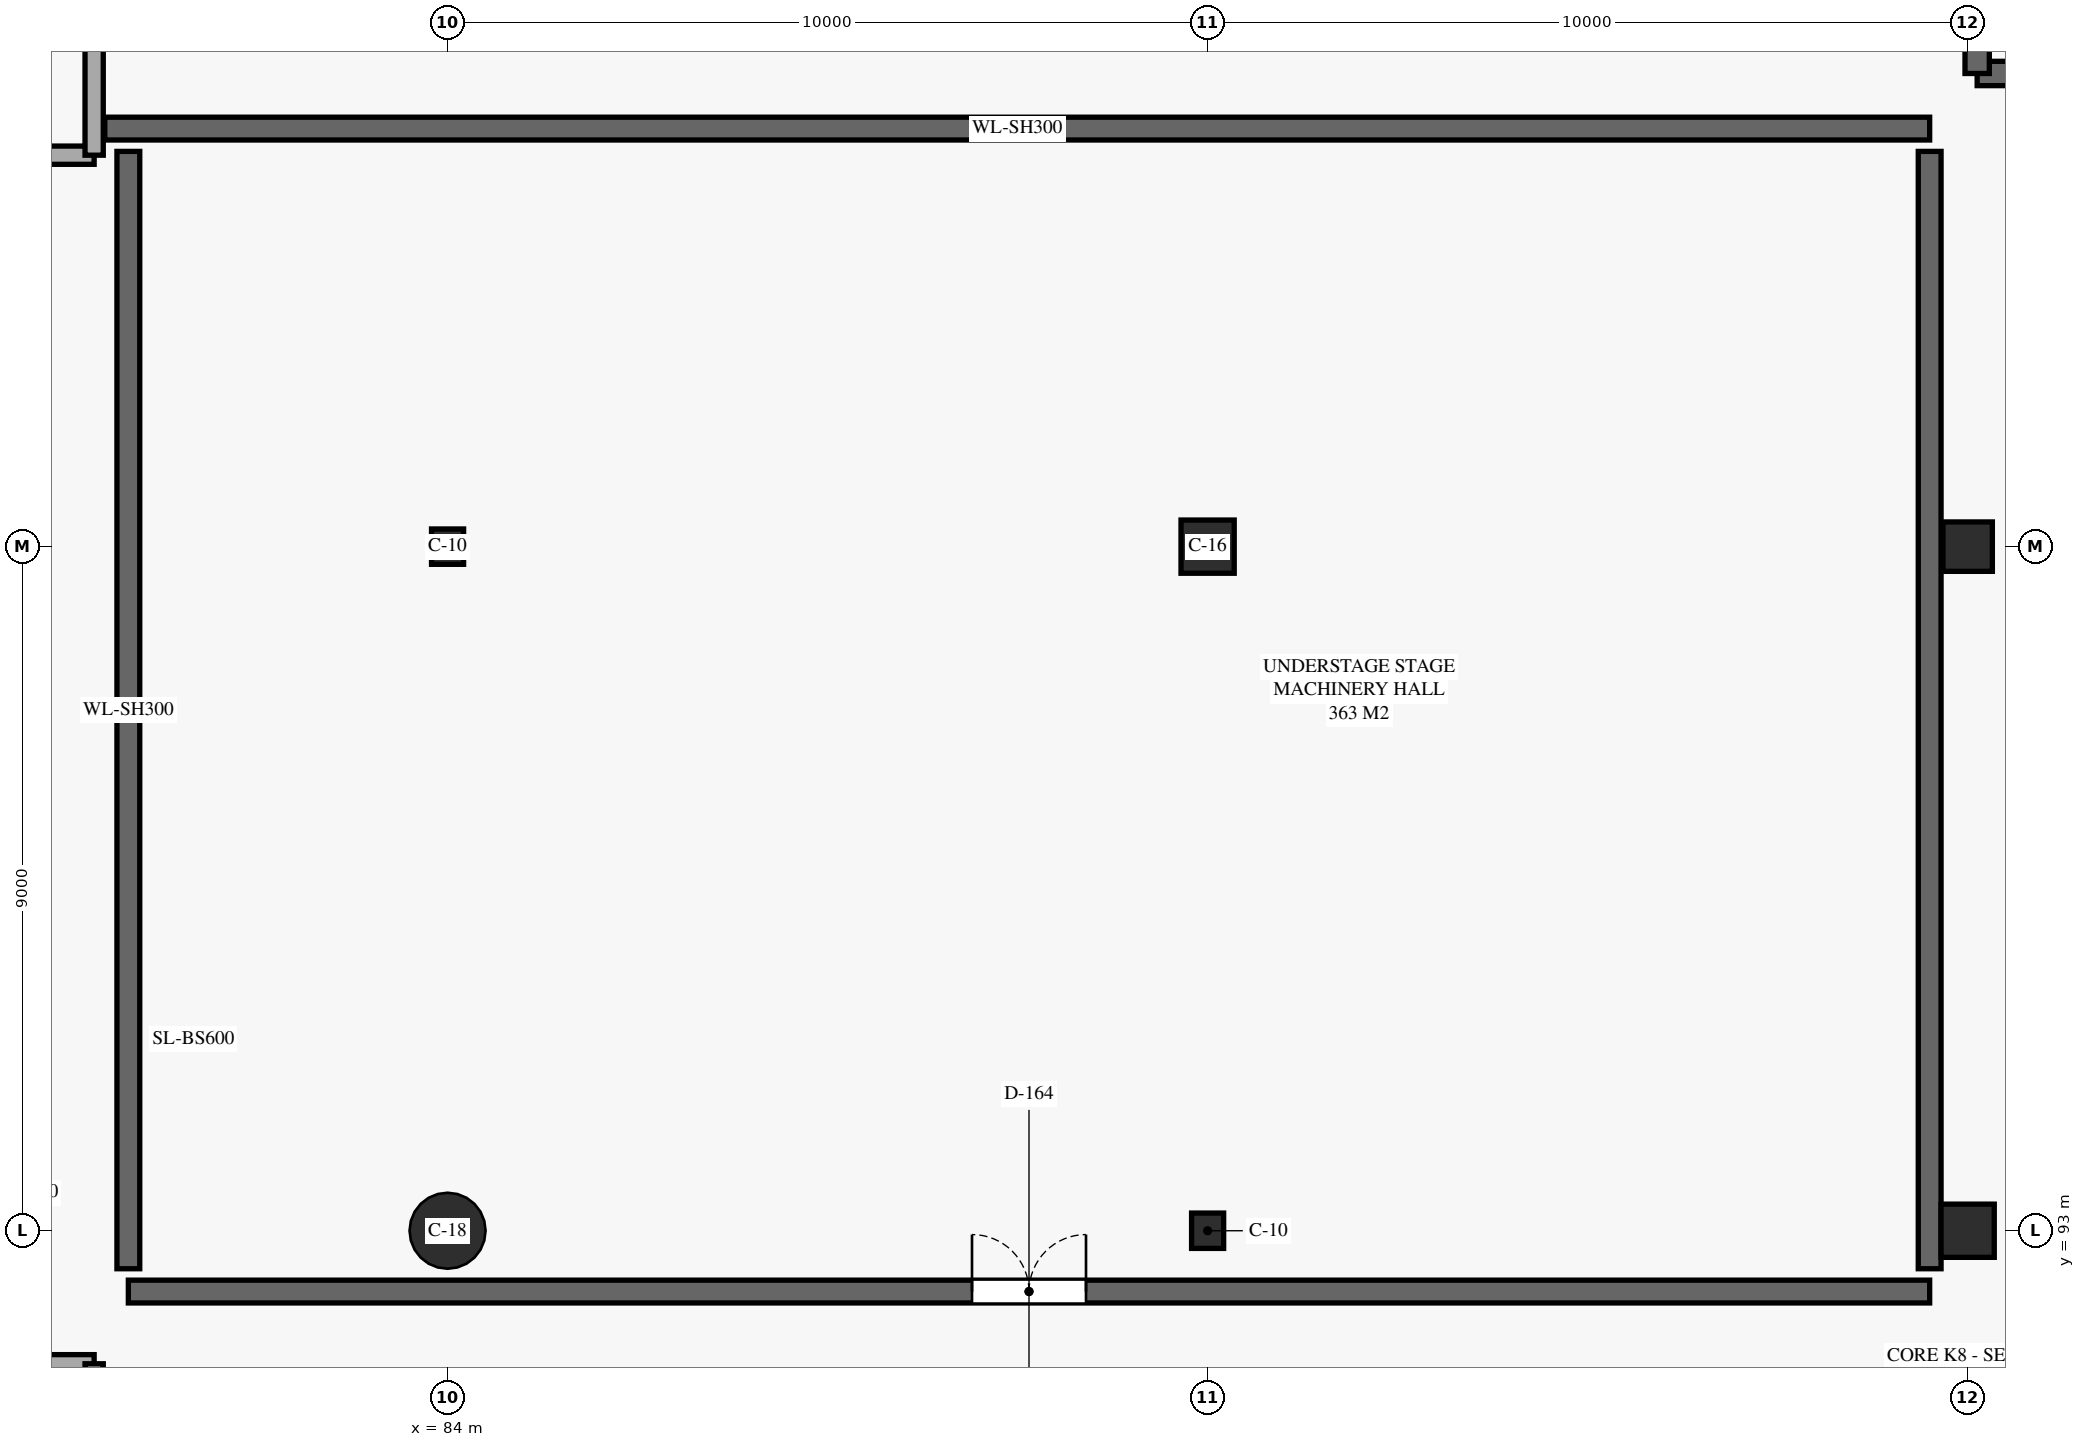
"""IFC4 building model, lengths in metres.
Left out: names, types, materials, properties, quantities, classifications, styles, units other than length and angle.
Written with IfcOpenShell. Run it as: python <this file> out.ifc"""

import sys

from ifc_helpers import new_model, si_unit, direction, frame, frame_2d, origin, origin_2d, place, context, subcontext, project, spatial, rectangle, circle, i_section, extrude, element, fill, save


model = new_model("IFC4")
c1 = context("Model", 3, precision=1e-05, world=origin(), true_north=direction((0.0, 1.0)))
c2 = subcontext(c1, "Body", "Model", "MODEL_VIEW")
j1 = project(units=[si_unit("LENGTHUNIT", "METRE"), si_unit("PLANEANGLEUNIT", "RADIAN")], contexts=[c1])
p1 = place(None, origin())
s1 = spatial("IfcSite", under=j1, at=p1, CompositionType="ELEMENT")
p2 = place(p1, origin())
s2 = spatial("IfcBuilding", under=s1, at=p2, CompositionType="ELEMENT")
p3 = place(p2, frame((0.0, 0.0, -5.4)))
s3 = spatial("IfcBuildingStorey", under=s2, at=p3, CompositionType="ELEMENT", Elevation=-5.4)
p4 = place(p3, frame((84.0, 93.0, -0.6), z_axis=(0.0, 0.0, 1.0), x_axis=(1.0, 0.0, 0.0)))
e1 = element("IfcColumn", 1, at=p4, inside=s3, PredefinedType="COLUMN", context=c2, shape_type="SweptSolid", body=[
    extrude(circle(Radius=0.5, at=origin_2d()), origin(), (0.0, 0.0, 1.0), 6.0),
])
for number, where, z_axis, x_axis in (
    (2, (84.0, 102.0, -0.6), (0.0, 0.0, 1.0), (1.0, 0.0, 0.0)),
    (3, (94.0, 93.0, -0.6), (0.0, 0.0, 1.0), (1.0, 0.0, 0.0)),
):
    element("IfcColumn", number, at=place(p3, frame(where, z_axis=z_axis, x_axis=x_axis)), inside=s3, PredefinedType="COLUMN", context=c2, shape_type="SweptSolid", body=[
        extrude(i_section(OverallWidth=0.422, OverallDepth=0.465, WebThickness=0.045, FlangeThickness=0.073, FilletRadius=0.02, at=origin_2d()), origin(), (0.0, 0.0, 1.0), 6.0),
    ])
for number, where, z_axis, x_axis in (
    (4, (94.0, 102.0, -0.6), (0.0, 0.0, 1.0), (1.0, 0.0, 0.0)),
    (5, (104.0, 93.0, -0.6), (0.0, 0.0, 1.0), (1.0, 0.0, 0.0)),
):
    element("IfcColumn", number, at=place(p3, frame(where, z_axis=z_axis, x_axis=x_axis)), inside=s3, PredefinedType="COLUMN", context=c2, shape_type="SweptSolid", body=[
        extrude(rectangle(XDim=0.7, YDim=0.7, at=origin_2d()), origin(), (0.0, 0.0, 1.0), 6.0),
    ])
p5 = place(p3, frame((104.0, 102.0, -0.6), z_axis=(0.0, 0.0, 1.0), x_axis=(1.0, 0.0, 0.0)))
e6 = element("IfcColumn", 6, at=p5, inside=s3, PredefinedType="COLUMN", context=c2, shape_type="SweptSolid", body=[
    extrude(rectangle(XDim=0.65, YDim=0.65, at=origin_2d()), origin(), (0.0, 0.0, 1.0), 6.0),
])
p6 = place(p3, frame((104.125, 108.225, 0.0), z_axis=(0.0, 0.0, 1.0), x_axis=(1.0, 0.0, 0.0)))
e7 = element("IfcWall", 7, at=p6, inside=s3, PredefinedType="SHEAR", context=c2, shape_type="SweptSolid", body=[
    extrude(rectangle(XDim=9.25, YDim=0.32, at=frame_2d((4.625, 0.0))), origin(), (0.0, 0.0, 1.0), 5.0),
])
p7 = place(p6, frame((0.8, 0.0, 0.0)))
e8 = element("IfcOpeningElement", 8, at=p7, cuts=e7, PredefinedType="OPENING", context=c2, shape_type="SweptSolid", body=[
    extrude(rectangle(XDim=1.15, YDim=2.2, at=frame_2d((0.575, 1.1))), frame((0.0, 0.17, 0.0), z_axis=(0.0, -1.0, 0.0), x_axis=(1.0, 0.0, 0.0)), (0.0, 0.0, 1.0), 0.34),
])
p8 = place(p3, frame((104.125, 113.275, 0.0), z_axis=(0.0, 0.0, 1.0), x_axis=(0.0, -1.0, 0.0)))
e9 = element("IfcWall", 9, at=p8, inside=s3, PredefinedType="SHEAR", context=c2, shape_type="SweptSolid", body=[
    extrude(rectangle(XDim=5.05, YDim=0.32, at=frame_2d((2.525, 0.0))), origin(), (0.0, 0.0, 1.0), 5.0),
])
p9 = place(p3, frame((74.55, 91.25, 0.0), z_axis=(0.0, 0.0, 1.0), x_axis=(1.0, 0.0, 0.0)))
e10 = element("IfcWall", 10, at=p9, inside=s3, PredefinedType="SOLIDWALL", context=c2, shape_type="SweptSolid", body=[
    extrude(rectangle(XDim=4.8, YDim=0.24, at=frame_2d((2.4, 0.0))), origin(), (0.0, 0.0, 1.0), 5.0),
])
p10 = place(p9, frame((1.2, 0.0, 0.0)))
e11 = element("IfcOpeningElement", 11, at=p10, cuts=e10, PredefinedType="OPENING", context=c2, shape_type="SweptSolid", body=[
    extrude(rectangle(XDim=1.6, YDim=2.2, at=frame_2d((0.8, 1.1))), frame((0.0, 0.13, 0.0), z_axis=(0.0, -1.0, 0.0), x_axis=(1.0, 0.0, 0.0)), (0.0, 0.0, 1.0), 0.26),
])
p11 = place(p3, frame((79.35, 87.45, 0.0), z_axis=(0.0, 0.0, 1.0), x_axis=(0.0, 1.0, 0.0)))
e12 = element("IfcWall", 12, at=p11, inside=s3, PredefinedType="SOLIDWALL", context=c2, shape_type="SweptSolid", body=[
    extrude(rectangle(XDim=3.8, YDim=0.24, at=frame_2d((1.9, 0.0))), origin(), (0.0, 0.0, 1.0), 5.0),
])
p12 = place(p3, frame((74.55, 107.15, 0.0), z_axis=(0.0, 0.0, 1.0), x_axis=(1.0, 0.0, 0.0)))
e13 = element("IfcWall", 13, at=p12, inside=s3, PredefinedType="SOLIDWALL", context=c2, shape_type="SweptSolid", body=[
    extrude(rectangle(XDim=4.8, YDim=0.24, at=frame_2d((2.4, 0.0))), origin(), (0.0, 0.0, 1.0), 5.0),
])
p13 = place(p12, frame((1.2, 0.0, 0.0)))
e14 = element("IfcOpeningElement", 14, at=p13, cuts=e13, PredefinedType="OPENING", context=c2, shape_type="SweptSolid", body=[
    extrude(rectangle(XDim=1.6, YDim=2.2, at=frame_2d((0.8, 1.1))), frame((0.0, 0.13, 0.0), z_axis=(0.0, -1.0, 0.0), x_axis=(1.0, 0.0, 0.0)), (0.0, 0.0, 1.0), 0.26),
])
p14 = place(p3, frame((79.35, 107.15, 0.0), z_axis=(0.0, 0.0, 1.0), x_axis=(0.0, 1.0, 0.0)))
e15 = element("IfcWall", 15, at=p14, inside=s3, PredefinedType="SOLIDWALL", context=c2, shape_type="SweptSolid", body=[
    extrude(rectangle(XDim=3.8, YDim=0.24, at=frame_2d((1.9, 0.0))), origin(), (0.0, 0.0, 1.0), 5.0),
])
p15 = place(p3, frame((79.8, 92.2, 0.0), z_axis=(0.0, 0.0, 1.0), x_axis=(1.0, 0.0, 0.0)))
e16 = element("IfcWall", 16, at=p15, inside=s3, PredefinedType="SHEAR", context=c2, shape_type="SweptSolid", body=[
    extrude(rectangle(XDim=23.7, YDim=0.3, at=frame_2d((11.85, 0.0))), origin(), (0.0, 0.0, 1.0), 5.0),
])
p16 = place(p15, frame((11.1, 0.0, 0.0)))
e17 = element("IfcOpeningElement", 17, at=p16, cuts=e16, PredefinedType="OPENING", context=c2, shape_type="SweptSolid", body=[
    extrude(rectangle(XDim=1.5, YDim=2.25, at=frame_2d((0.75, 1.125))), frame((0.0, 0.16, 0.0), z_axis=(0.0, -1.0, 0.0), x_axis=(1.0, 0.0, 0.0)), (0.0, 0.0, 1.0), 0.32),
])
p17 = place(p3, frame((103.5, 107.5, 0.0), z_axis=(0.0, 0.0, 1.0), x_axis=(-1.0, 0.0, 0.0)))
e18 = element("IfcWall", 18, at=p17, inside=s3, PredefinedType="SHEAR", context=c2, shape_type="SweptSolid", body=[
    extrude(rectangle(XDim=24.01, YDim=0.3, at=frame_2d((12.005, 0.0))), origin(), (0.0, 0.0, 1.0), 5.0),
])
for number, where, z_axis, x_axis in (
    (19, (79.8, 107.2, 0.0), (0.0, 0.0, 1.0), (0.0, -1.0, 0.0)),
    (20, (103.5, 92.5, 0.0), (0.0, 0.0, 1.0), (0.0, 1.0, 0.0)),
):
    element("IfcWall", number, at=place(p3, frame(where, z_axis=z_axis, x_axis=x_axis)), inside=s3, PredefinedType="SHEAR", context=c2, shape_type="SweptSolid", body=[
        extrude(rectangle(XDim=14.7, YDim=0.3, at=frame_2d((7.35, 0.0))), origin(), (0.0, 0.0, 1.0), 5.0),
    ])
p18 = place(p16, origin())
e21 = element("IfcDoor", 21, at=p18, inside=s3, OperationType="DOUBLE_DOOR_SINGLE_SWING", PredefinedType="DOOR", context=c2, shape_type="SweptSolid", body=[
    extrude(rectangle(XDim=1.5, YDim=2.25, at=frame_2d((0.75, 1.125))), frame((0.0, 0.025, 0.0), z_axis=(0.0, -1.0, 0.0), x_axis=(1.0, 0.0, 0.0)), (0.0, 0.0, 1.0), 0.05),
])
fill(e17, e21)
save(model, sys.argv[1])
